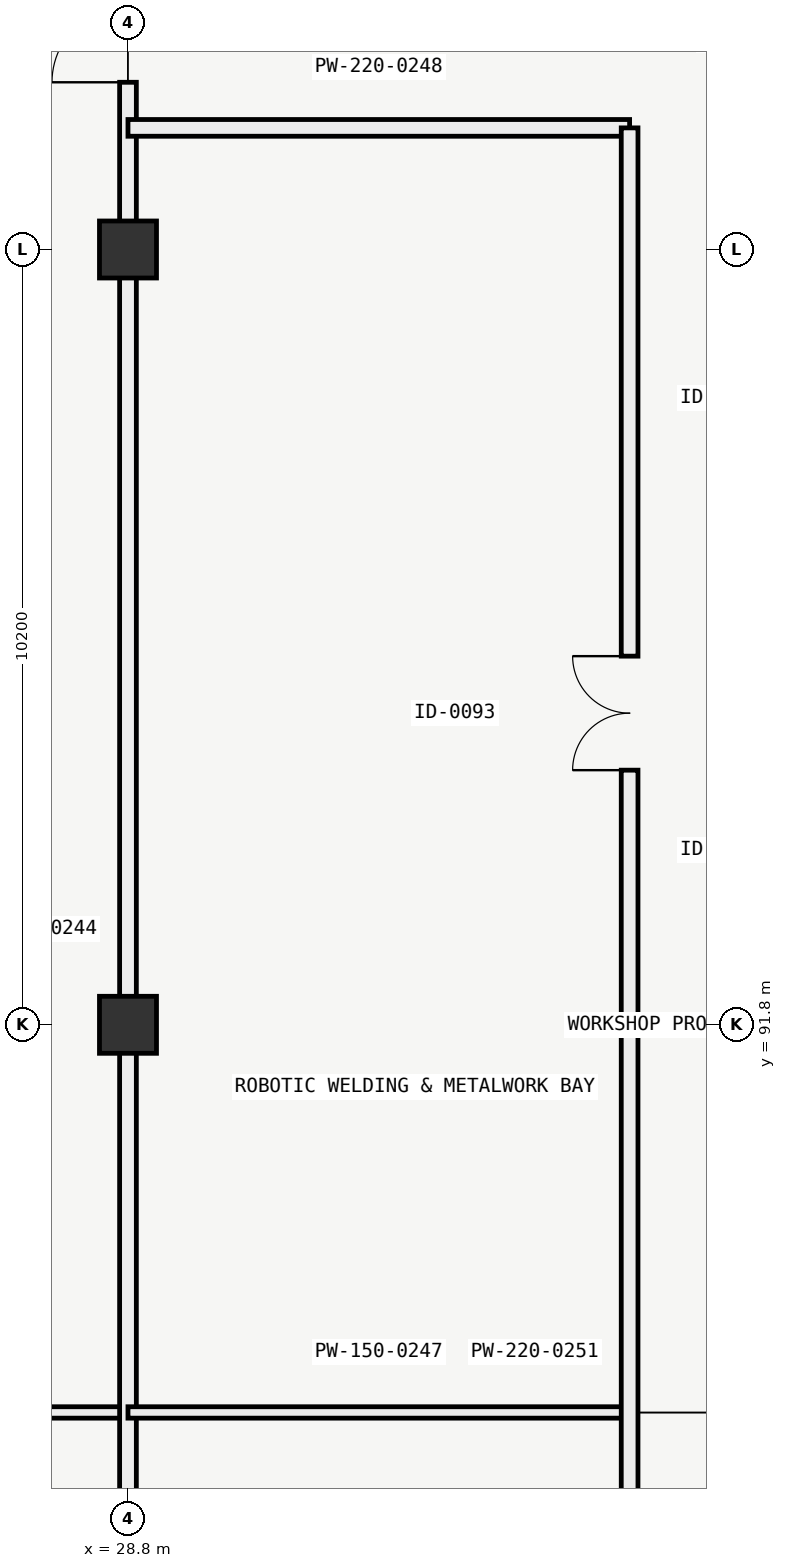
"""IFC4 building model, lengths in metres.
Left out: names, types, materials, properties, quantities, classifications, styles, units other than length and angle.
Written with IfcOpenShell. Run it as: python <this file> out.ifc"""

import sys

from ifc_helpers import new_model, si_unit, direction, frame, frame_2d, origin, origin_2d, place, context, subcontext, project, spatial, rectangle, extrude, element, fill, save


model = new_model("IFC4")
c1 = context("Model", 3, precision=1e-05, world=origin(), true_north=direction((0.0, 1.0)))
c2 = subcontext(c1, "Body", "Model", "MODEL_VIEW")
j1 = project(units=[si_unit("LENGTHUNIT", "METRE"), si_unit("PLANEANGLEUNIT", "RADIAN")], contexts=[c1])
p1 = place(None, origin())
s1 = spatial("IfcSite", under=j1, at=p1, CompositionType="ELEMENT")
p2 = place(p1, origin())
s2 = spatial("IfcBuilding", under=s1, at=p2, CompositionType="ELEMENT")
p3 = place(p2, origin())
s3 = spatial("IfcBuildingStorey", under=s2, at=p3, CompositionType="ELEMENT", Elevation=0.0)
for number, where, z_axis, x_axis in (
    (1, (28.8, 91.8, 0.0), (0.0, 0.0, 1.0), (1.0, 0.0, 0.0)),
    (2, (28.8, 102.0, 0.0), (0.0, 0.0, 1.0), (1.0, 0.0, 0.0)),
):
    element("IfcColumn", number, at=place(p3, frame(where, z_axis=z_axis, x_axis=x_axis)), inside=s3, PredefinedType="COLUMN", context=c2, shape_type="SweptSolid", body=[
        extrude(rectangle(XDim=0.75, YDim=0.75, at=origin_2d()), origin(), (0.0, 0.0, 1.0), 5.4),
    ])
p4 = place(p3, frame((0.15, 86.7, 0.0), z_axis=(0.0, 0.0, 1.0), x_axis=(1.0, 0.0, 0.0)))
e3 = element("IfcWall", 3, at=p4, inside=s3, PredefinedType="PARTITIONING", context=c2, shape_type="SweptSolid", body=[
    extrude(rectangle(XDim=28.65, YDim=0.15, at=frame_2d((14.325, 0.0))), origin(), (0.0, 0.0, 1.0), 3.7),
])
p5 = place(p4, frame((14.25, 0.0, 0.0)))
e4 = element("IfcOpeningElement", 4, at=p5, cuts=e3, PredefinedType="OPENING", context=c2, shape_type="SweptSolid", body=[
    extrude(rectangle(XDim=2.0, YDim=2.4, at=frame_2d((1.0, 1.2))), frame((0.0, 0.085, 0.0), z_axis=(0.0, -1.0, 0.0), x_axis=(1.0, 0.0, 0.0)), (0.0, 0.0, 1.0), 0.17),
])
p6 = place(p3, frame((28.8, 51.15, 0.0), z_axis=(0.0, 0.0, 1.0), x_axis=(0.0, 1.0, 0.0)))
e5 = element("IfcWall", 5, at=p6, inside=s3, PredefinedType="PARTITIONING", context=c2, shape_type="SweptSolid", body=[
    extrude(rectangle(XDim=71.1, YDim=0.22, at=frame_2d((35.55, 0.0))), origin(), (0.0, 0.0, 1.0), 3.94),
])
p7 = place(p6, frame((16.25, 0.0, 0.0)))
e6 = element("IfcOpeningElement", 6, at=p7, cuts=e5, PredefinedType="OPENING", context=c2, shape_type="SweptSolid", body=[
    extrude(rectangle(XDim=2.0, YDim=2.4, at=frame_2d((1.0, 1.2))), frame((0.0, 0.12, 0.0), z_axis=(0.0, -1.0, 0.0), x_axis=(1.0, 0.0, 0.0)), (0.0, 0.0, 1.0), 0.24),
])
p8 = place(p6, frame((53.05, 0.0, 0.0)))
e7 = element("IfcOpeningElement", 7, at=p8, cuts=e5, PredefinedType="OPENING", context=c2, shape_type="SweptSolid", body=[
    extrude(rectangle(XDim=2.0, YDim=2.4, at=frame_2d((1.0, 1.2))), frame((0.0, 0.12, 0.0), z_axis=(0.0, -1.0, 0.0), x_axis=(1.0, 0.0, 0.0)), (0.0, 0.0, 1.0), 0.24),
])
p9 = place(p3, frame((28.8, 86.7, 0.0), z_axis=(0.0, 0.0, 1.0), x_axis=(1.0, 0.0, 0.0)))
e8 = element("IfcWall", 8, at=p9, inside=s3, PredefinedType="PARTITIONING", context=c2, shape_type="SweptSolid", body=[
    extrude(rectangle(XDim=6.6, YDim=0.15, at=frame_2d((3.3, 0.0))), origin(), (0.0, 0.0, 1.0), 4.643),
])
p10 = place(p3, frame((28.8, 103.6, 0.0), z_axis=(0.0, 0.0, 1.0), x_axis=(1.0, 0.0, 0.0)))
e9 = element("IfcWall", 9, at=p10, inside=s3, PredefinedType="PARTITIONING", context=c2, shape_type="SweptSolid", body=[
    extrude(rectangle(XDim=6.6, YDim=0.22, at=frame_2d((3.3, 0.0))), origin(), (0.0, 0.0, 1.0), 4.643),
])
p11 = place(p3, frame((35.4, 70.0, 0.0), z_axis=(0.0, 0.0, 1.0), x_axis=(0.0, 1.0, 0.0)))
e10 = element("IfcWall", 10, at=p11, inside=s3, PredefinedType="PARTITIONING", context=c2, shape_type="SweptSolid", body=[
    extrude(rectangle(XDim=33.6, YDim=0.22, at=frame_2d((16.8, 0.0))), origin(), (0.0, 0.0, 1.0), 4.493),
])
p12 = place(p11, frame((8.35, 0.0, 0.0)))
e11 = element("IfcOpeningElement", 11, at=p12, cuts=e10, PredefinedType="OPENING", context=c2, shape_type="SweptSolid", body=[
    extrude(rectangle(XDim=1.5, YDim=2.2, at=frame_2d((0.75, 1.1))), frame((0.0, 0.12, 0.0), z_axis=(0.0, -1.0, 0.0), x_axis=(1.0, 0.0, 0.0)), (0.0, 0.0, 1.0), 0.24),
])
p13 = place(p11, frame((25.15, 0.0, 0.0)))
e12 = element("IfcOpeningElement", 12, at=p13, cuts=e10, PredefinedType="OPENING", context=c2, shape_type="SweptSolid", body=[
    extrude(rectangle(XDim=1.5, YDim=2.2, at=frame_2d((0.75, 1.1))), frame((0.0, 0.12, 0.0), z_axis=(0.0, -1.0, 0.0), x_axis=(1.0, 0.0, 0.0)), (0.0, 0.0, 1.0), 0.24),
])
p14 = place(p8, origin())
e13 = element("IfcDoor", 13, at=p14, inside=s3, OperationType="DOUBLE_DOOR_SINGLE_SWING", PredefinedType="DOOR", context=c2, shape_type="SweptSolid", body=[
    extrude(rectangle(XDim=2.0, YDim=2.4, at=frame_2d((1.0, 1.2))), frame((0.0, 0.025, 0.0), z_axis=(0.0, -1.0, 0.0), x_axis=(1.0, 0.0, 0.0)), (0.0, 0.0, 1.0), 0.05),
])
fill(e7, e13)
p15 = place(p13, origin())
e14 = element("IfcDoor", 14, at=p15, inside=s3, OperationType="DOUBLE_DOOR_SINGLE_SWING", PredefinedType="DOOR", context=c2, shape_type="SweptSolid", body=[
    extrude(rectangle(XDim=1.5, YDim=2.2, at=frame_2d((0.75, 1.1))), frame((0.0, 0.025, 0.0), z_axis=(0.0, -1.0, 0.0), x_axis=(1.0, 0.0, 0.0)), (0.0, 0.0, 1.0), 0.05),
])
fill(e12, e14)
save(model, sys.argv[1])
